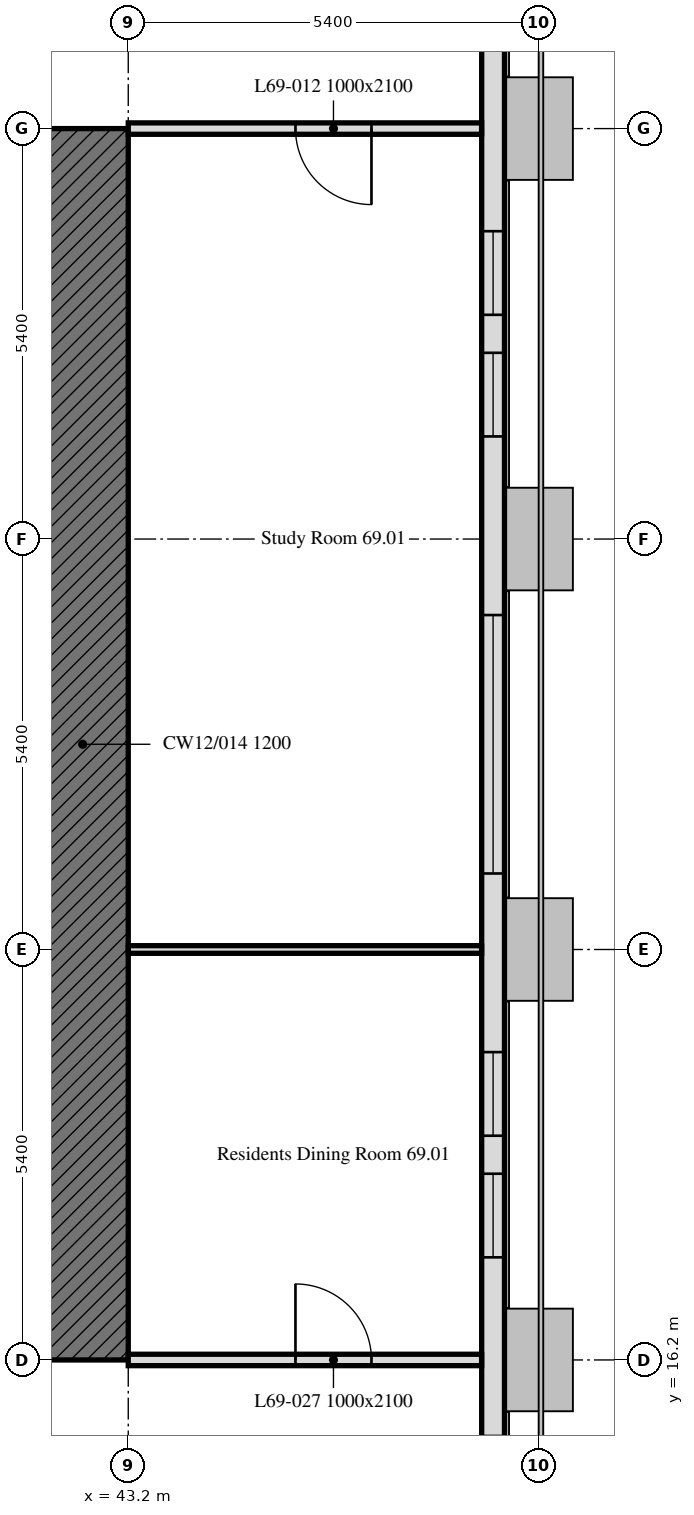
"""IFC4 building model, lengths in metres.
Left out: names, types, materials, properties, quantities, classifications, styles, units other than length and angle.
Written with IfcOpenShell. Run it as: python <this file> out.ifc"""

import sys

from ifc_helpers import new_model, si_unit, direction, frame, frame_2d, origin, place, context, subcontext, project, spatial, rectangle, extrude, element, fill, save


model = new_model("IFC4")
c1 = context("Model", 3, precision=1e-05, world=origin(), true_north=direction((0.0, 1.0)))
c2 = subcontext(c1, "Body", "Model", "MODEL_VIEW")
j1 = project(units=[si_unit("LENGTHUNIT", "METRE"), si_unit("PLANEANGLEUNIT", "RADIAN")], contexts=[c1])
p1 = place(None, origin())
s1 = spatial("IfcSite", under=j1, at=p1, CompositionType="ELEMENT")
p2 = place(p1, origin())
s2 = spatial("IfcBuilding", under=s1, at=p2, CompositionType="ELEMENT")
p3 = place(p2, frame((0.0, 0.0, 281.8)))
s3 = spatial("IfcBuildingStorey", under=s2, at=p3, CompositionType="ELEMENT", Elevation=281.8)
p4 = place(p3, frame((48.0, 5.586, 0.0), z_axis=(0.0, 0.0, 1.0), x_axis=(0.0, 1.0, 0.0)))
e1 = element("IfcWall", 1, at=p4, inside=s3, PredefinedType="SOLIDWALL", context=c2, shape_type="SweptSolid", body=[
    extrude(rectangle(XDim=32.027, YDim=0.3, at=frame_2d((16.014, 0.0))), origin(), (0.0, 0.0, 1.0), 3.0),
])
p5 = place(p4, frame((1.164, 0.0, 0.9)))
e2 = element("IfcOpeningElement", 2, at=p5, cuts=e1, PredefinedType="OPENING", context=c2, shape_type="SweptSolid", body=[
    extrude(rectangle(XDim=1.1, YDim=1.7, at=frame_2d((0.55, 0.85))), frame((0.0, 0.16, 0.0), z_axis=(0.0, -1.0, 0.0), x_axis=(1.0, 0.0, 0.0)), (0.0, 0.0, 1.0), 0.32),
])
p6 = place(p4, frame((2.764, 0.0, 0.9)))
e3 = element("IfcOpeningElement", 3, at=p6, cuts=e1, PredefinedType="OPENING", context=c2, shape_type="SweptSolid", body=[
    extrude(rectangle(XDim=1.1, YDim=1.7, at=frame_2d((0.55, 0.85))), frame((0.0, 0.16, 0.0), z_axis=(0.0, -1.0, 0.0), x_axis=(1.0, 0.0, 0.0)), (0.0, 0.0, 1.0), 0.32),
])
p7 = place(p4, frame((6.564, 0.0, 0.9)))
e4 = element("IfcOpeningElement", 4, at=p7, cuts=e1, PredefinedType="OPENING", context=c2, shape_type="SweptSolid", body=[
    extrude(rectangle(XDim=1.1, YDim=1.7, at=frame_2d((0.55, 0.85))), frame((0.0, 0.16, 0.0), z_axis=(0.0, -1.0, 0.0), x_axis=(1.0, 0.0, 0.0)), (0.0, 0.0, 1.0), 0.32),
])
p8 = place(p4, frame((8.514, 0.0, 0.9)))
e5 = element("IfcOpeningElement", 5, at=p8, cuts=e1, PredefinedType="OPENING", context=c2, shape_type="SweptSolid", body=[
    extrude(rectangle(XDim=1.1, YDim=1.7, at=frame_2d((0.55, 0.85))), frame((0.0, 0.16, 0.0), z_axis=(0.0, -1.0, 0.0), x_axis=(1.0, 0.0, 0.0)), (0.0, 0.0, 1.0), 0.32),
])
p9 = place(p4, frame((11.964, 0.0, 0.9)))
e6 = element("IfcOpeningElement", 6, at=p9, cuts=e1, PredefinedType="OPENING", context=c2, shape_type="SweptSolid", body=[
    extrude(rectangle(XDim=1.1, YDim=1.7, at=frame_2d((0.55, 0.85))), frame((0.0, 0.16, 0.0), z_axis=(0.0, -1.0, 0.0), x_axis=(1.0, 0.0, 0.0)), (0.0, 0.0, 1.0), 0.32),
])
p10 = place(p4, frame((13.564, 0.0, 0.9)))
e7 = element("IfcOpeningElement", 7, at=p10, cuts=e1, PredefinedType="OPENING", context=c2, shape_type="SweptSolid", body=[
    extrude(rectangle(XDim=1.1, YDim=1.7, at=frame_2d((0.55, 0.85))), frame((0.0, 0.16, 0.0), z_axis=(0.0, -1.0, 0.0), x_axis=(1.0, 0.0, 0.0)), (0.0, 0.0, 1.0), 0.32),
])
p11 = place(p4, frame((17.014, 0.0, 0.9)))
e8 = element("IfcOpeningElement", 8, at=p11, cuts=e1, PredefinedType="OPENING", context=c2, shape_type="SweptSolid", body=[
    extrude(rectangle(XDim=3.4, YDim=1.7, at=frame_2d((1.7, 0.85))), frame((0.0, 0.16, 0.0), z_axis=(0.0, -1.0, 0.0), x_axis=(1.0, 0.0, 0.0)), (0.0, 0.0, 1.0), 0.32),
])
p12 = place(p4, frame((22.764, 0.0, 0.9)))
e9 = element("IfcOpeningElement", 9, at=p12, cuts=e1, PredefinedType="OPENING", context=c2, shape_type="SweptSolid", body=[
    extrude(rectangle(XDim=1.1, YDim=1.7, at=frame_2d((0.55, 0.85))), frame((0.0, 0.16, 0.0), z_axis=(0.0, -1.0, 0.0), x_axis=(1.0, 0.0, 0.0)), (0.0, 0.0, 1.0), 0.32),
])
p13 = place(p4, frame((24.364, 0.0, 0.9)))
e10 = element("IfcOpeningElement", 10, at=p13, cuts=e1, PredefinedType="OPENING", context=c2, shape_type="SweptSolid", body=[
    extrude(rectangle(XDim=1.1, YDim=1.7, at=frame_2d((0.55, 0.85))), frame((0.0, 0.16, 0.0), z_axis=(0.0, -1.0, 0.0), x_axis=(1.0, 0.0, 0.0)), (0.0, 0.0, 1.0), 0.32),
])
p14 = place(p4, frame((28.239, 0.0, 0.9)))
e11 = element("IfcOpeningElement", 11, at=p14, cuts=e1, PredefinedType="OPENING", context=c2, shape_type="SweptSolid", body=[
    extrude(rectangle(XDim=0.65, YDim=1.7, at=frame_2d((0.325, 0.85))), frame((0.0, 0.16, 0.0), z_axis=(0.0, -1.0, 0.0), x_axis=(1.0, 0.0, 0.0)), (0.0, 0.0, 1.0), 0.32),
])
p15 = place(p4, frame((29.764, 0.0, 0.9)))
e12 = element("IfcOpeningElement", 12, at=p15, cuts=e1, PredefinedType="OPENING", context=c2, shape_type="SweptSolid", body=[
    extrude(rectangle(XDim=1.1, YDim=1.7, at=frame_2d((0.55, 0.85))), frame((0.0, 0.16, 0.0), z_axis=(0.0, -1.0, 0.0), x_axis=(1.0, 0.0, 0.0)), (0.0, 0.0, 1.0), 0.32),
])
p16 = place(p3, frame((42.6, 32.4, 0.0), z_axis=(0.0, 0.0, 1.0), x_axis=(0.0, -1.0, 0.0)))
e13 = element("IfcWall", 13, at=p16, inside=s3, PredefinedType="SOLIDWALL", context=c2, shape_type="SweptSolid", body=[
    extrude(rectangle(XDim=16.2, YDim=1.2, at=frame_2d((8.1, 0.0))), origin(), (0.0, 0.0, 1.0), 3.0),
])
p17 = place(p3, frame((47.849, 32.4, 0.0), z_axis=(0.0, 0.0, 1.0), x_axis=(-1.0, 0.0, 0.0)))
e14 = element("IfcWall", 14, at=p17, inside=s3, PredefinedType="PARTITIONING", context=c2, shape_type="SweptSolid", body=[
    extrude(rectangle(XDim=4.649, YDim=0.15, at=frame_2d((2.325, 0.0))), origin(), (0.0, 0.0, 1.0), 2.4),
])
p18 = place(p17, frame((1.449, 0.0, 0.0)))
e15 = element("IfcOpeningElement", 15, at=p18, cuts=e14, PredefinedType="OPENING", context=c2, shape_type="SweptSolid", body=[
    extrude(rectangle(XDim=1.0, YDim=2.1, at=frame_2d((0.5, 1.05))), frame((0.0, 0.075, 0.0), z_axis=(0.0, -1.0, 0.0), x_axis=(1.0, 0.0, 0.0)), (0.0, 0.0, 1.0), 0.15),
])
p19 = place(p3, frame((43.2, 21.6, 0.0), z_axis=(0.0, 0.0, 1.0), x_axis=(1.0, 0.0, 0.0)))
e16 = element("IfcWall", 16, at=p19, inside=s3, PredefinedType="PARTITIONING", context=c2, shape_type="SweptSolid", body=[
    extrude(rectangle(XDim=4.649, YDim=0.1, at=frame_2d((2.325, 0.0))), origin(), (0.0, 0.0, 1.0), 2.4),
])
p20 = place(p3, frame((43.2, 16.2, 0.0), z_axis=(0.0, 0.0, 1.0), x_axis=(1.0, 0.0, 0.0)))
e17 = element("IfcWall", 17, at=p20, inside=s3, PredefinedType="PARTITIONING", context=c2, shape_type="SweptSolid", body=[
    extrude(rectangle(XDim=4.649, YDim=0.15, at=frame_2d((2.325, 0.0))), origin(), (0.0, 0.0, 1.0), 2.4),
])
p21 = place(p20, frame((2.2, 0.0, 0.0)))
e18 = element("IfcOpeningElement", 18, at=p21, cuts=e17, PredefinedType="OPENING", context=c2, shape_type="SweptSolid", body=[
    extrude(rectangle(XDim=1.0, YDim=2.1, at=frame_2d((0.5, 1.05))), frame((0.0, 0.075, 0.0), z_axis=(0.0, -1.0, 0.0), x_axis=(1.0, 0.0, 0.0)), (0.0, 0.0, 1.0), 0.15),
])
p22 = place(p8, origin())
e19 = element("IfcWindow", 19, at=p22, inside=s3, PartitioningType="SINGLE_PANEL", PredefinedType="WINDOW", context=c2, shape_type="SweptSolid", body=[
    extrude(rectangle(XDim=1.1, YDim=1.7, at=frame_2d((0.55, 0.85))), frame((0.0, 0.03, 0.0), z_axis=(0.0, -1.0, 0.0), x_axis=(1.0, 0.0, 0.0)), (0.0, 0.0, 1.0), 0.06),
])
fill(e5, e19)
p23 = place(p9, origin())
e20 = element("IfcWindow", 20, at=p23, inside=s3, PartitioningType="SINGLE_PANEL", PredefinedType="WINDOW", context=c2, shape_type="SweptSolid", body=[
    extrude(rectangle(XDim=1.1, YDim=1.7, at=frame_2d((0.55, 0.85))), frame((0.0, 0.03, 0.0), z_axis=(0.0, -1.0, 0.0), x_axis=(1.0, 0.0, 0.0)), (0.0, 0.0, 1.0), 0.06),
])
fill(e6, e20)
p24 = place(p10, origin())
e21 = element("IfcWindow", 21, at=p24, inside=s3, PartitioningType="SINGLE_PANEL", PredefinedType="WINDOW", context=c2, shape_type="SweptSolid", body=[
    extrude(rectangle(XDim=1.1, YDim=1.7, at=frame_2d((0.55, 0.85))), frame((0.0, 0.03, 0.0), z_axis=(0.0, -1.0, 0.0), x_axis=(1.0, 0.0, 0.0)), (0.0, 0.0, 1.0), 0.06),
])
fill(e7, e21)
p25 = place(p11, origin())
e22 = element("IfcWindow", 22, at=p25, inside=s3, PartitioningType="SINGLE_PANEL", PredefinedType="WINDOW", context=c2, shape_type="SweptSolid", body=[
    extrude(rectangle(XDim=3.4, YDim=1.7, at=frame_2d((1.7, 0.85))), frame((0.0, 0.03, 0.0), z_axis=(0.0, -1.0, 0.0), x_axis=(1.0, 0.0, 0.0)), (0.0, 0.0, 1.0), 0.06),
])
fill(e8, e22)
p26 = place(p12, origin())
e23 = element("IfcWindow", 23, at=p26, inside=s3, PartitioningType="SINGLE_PANEL", PredefinedType="WINDOW", context=c2, shape_type="SweptSolid", body=[
    extrude(rectangle(XDim=1.1, YDim=1.7, at=frame_2d((0.55, 0.85))), frame((0.0, 0.03, 0.0), z_axis=(0.0, -1.0, 0.0), x_axis=(1.0, 0.0, 0.0)), (0.0, 0.0, 1.0), 0.06),
])
fill(e9, e23)
p27 = place(p13, origin())
e24 = element("IfcWindow", 24, at=p27, inside=s3, PartitioningType="SINGLE_PANEL", PredefinedType="WINDOW", context=c2, shape_type="SweptSolid", body=[
    extrude(rectangle(XDim=1.1, YDim=1.7, at=frame_2d((0.55, 0.85))), frame((0.0, 0.03, 0.0), z_axis=(0.0, -1.0, 0.0), x_axis=(1.0, 0.0, 0.0)), (0.0, 0.0, 1.0), 0.06),
])
fill(e10, e24)
p28 = place(p18, origin())
e25 = element("IfcDoor", 25, at=p28, inside=s3, OperationType="SINGLE_SWING_RIGHT", PredefinedType="DOOR", context=c2, shape_type="SweptSolid", body=[
    extrude(rectangle(XDim=1.0, YDim=2.1, at=frame_2d((0.5, 1.05))), frame((0.0, 0.025, 0.0), z_axis=(0.0, -1.0, 0.0), x_axis=(1.0, 0.0, 0.0)), (0.0, 0.0, 1.0), 0.05),
])
fill(e15, e25)
p29 = place(p21, origin())
e26 = element("IfcDoor", 26, at=p29, inside=s3, OperationType="SINGLE_SWING_RIGHT", PredefinedType="DOOR", context=c2, shape_type="SweptSolid", body=[
    extrude(rectangle(XDim=1.0, YDim=2.1, at=frame_2d((0.5, 1.05))), frame((0.0, 0.025, 0.0), z_axis=(0.0, -1.0, 0.0), x_axis=(1.0, 0.0, 0.0)), (0.0, 0.0, 1.0), 0.05),
])
fill(e18, e26)
save(model, sys.argv[1])
